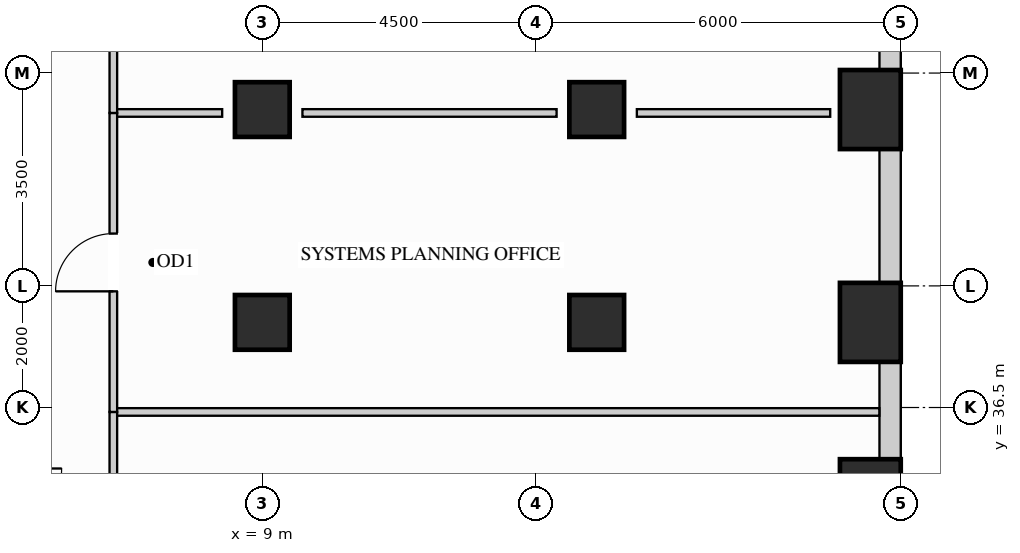
"""IFC4 building model, lengths in metres.
Left out: names, types, materials, properties, quantities, classifications, styles, units other than length and angle.
Written with IfcOpenShell. Run it as: python <this file> out.ifc"""

import sys

from ifc_helpers import new_model, si_unit, direction, frame, frame_2d, origin, origin_2d, place, context, subcontext, project, spatial, rectangle, extrude, source, transform, mapped, element, fill, save


model = new_model("IFC4")
c1 = context("Model", 3, precision=1e-05, world=origin(), true_north=direction((0.0, 1.0)))
c2 = subcontext(c1, "Body", "Model", "MODEL_VIEW")
j1 = project(units=[si_unit("LENGTHUNIT", "METRE"), si_unit("PLANEANGLEUNIT", "RADIAN")], contexts=[c1])
p1 = place(None, origin())
s1 = spatial("IfcSite", under=j1, at=p1, CompositionType="ELEMENT")
p2 = place(p1, origin())
s2 = spatial("IfcBuilding", under=s1, at=p2, CompositionType="ELEMENT")
p3 = place(p2, frame((0.0, 0.0, 22.5)))
s3 = spatial("IfcBuildingStorey", under=s2, at=p3, CompositionType="ELEMENT", Elevation=22.5)
m1 = source(origin(), c2, "Body", "SweptSolid", [
    extrude(rectangle(XDim=0.9, YDim=0.9, at=origin_2d()), origin(), (0.0, 0.0, 1.0), 3.38),
])
for number, where, z_axis, x_axis in (
    (1, (14.5, 37.9, 0.0), (0.0, 0.0, 1.0), (1.0, 0.0, 0.0)),
    (2, (14.5, 41.4, 0.0), (0.0, 0.0, 1.0), (1.0, 0.0, 0.0)),
    (3, (9.0, 37.9, 0.0), (0.0, 0.0, 1.0), (1.0, 0.0, 0.0)),
    (4, (9.0, 41.4, 0.0), (0.0, 0.0, 1.0), (1.0, 0.0, 0.0)),
):
    element("IfcColumn", number, at=place(p3, frame(where, z_axis=z_axis, x_axis=x_axis)), inside=s3, PredefinedType="COLUMN", context=c2, shape_type="MappedRepresentation", body=[
        mapped(m1, transform((0.0, 0.0, 0.0), x_axis=(1.0, 0.0, 0.0), y_axis=(0.0, 1.0, 0.0), z_axis=(0.0, 0.0, 1.0))),
    ])
m2 = source(origin(), c2, "Body", "SweptSolid", [
    extrude(rectangle(XDim=1.0, YDim=1.3, at=origin_2d()), origin(), (0.0, 0.0, 1.0), 3.38),
])
for number, where, z_axis, x_axis in (
    (5, (19.0, 35.0, 0.0), (0.0, 0.0, 1.0), (1.0, 0.0, 0.0)),
    (6, (19.0, 37.9, 0.0), (0.0, 0.0, 1.0), (1.0, 0.0, 0.0)),
    (7, (19.0, 41.4, 0.0), (0.0, 0.0, 1.0), (1.0, 0.0, 0.0)),
):
    element("IfcColumn", number, at=place(p3, frame(where, z_axis=z_axis, x_axis=x_axis)), inside=s3, PredefinedType="COLUMN", context=c2, shape_type="MappedRepresentation", body=[
        mapped(m2, transform((0.0, 0.0, 0.0), x_axis=(1.0, 0.0, 0.0), y_axis=(0.0, 1.0, 0.0), z_axis=(0.0, 0.0, 1.0))),
    ])
m3 = source(origin(), c2, "Body", "SweptSolid", [
    extrude(rectangle(XDim=1.604, YDim=0.35, at=frame_2d((0.802, 0.0))), origin(), (0.0, 0.0, 1.0), 2.51),
])
p4 = place(p3, frame((19.325, 35.648, 0.0), z_axis=(0.0, 0.0, 1.0), x_axis=(0.0, 1.0, 0.0)))
e8 = element("IfcWall", 8, at=p4, inside=s3, PredefinedType="SOLIDWALL", context=c2, shape_type="MappedRepresentation", body=[
    mapped(m3, transform((0.0, 0.0, 0.0), x_axis=(1.0, 0.0, 0.0), y_axis=(0.0, 1.0, 0.0), z_axis=(0.0, 0.0, 1.0))),
])
m4 = source(origin(), c2, "Body", "SweptSolid", [
    extrude(rectangle(XDim=2.204, YDim=0.35, at=frame_2d((1.102, 0.0))), origin(), (0.0, 0.0, 1.0), 2.51),
])
p5 = place(p3, frame((19.325, 38.548, 0.0), z_axis=(0.0, 0.0, 1.0), x_axis=(0.0, 1.0, 0.0)))
e9 = element("IfcWall", 9, at=p5, inside=s3, PredefinedType="SOLIDWALL", context=c2, shape_type="MappedRepresentation", body=[
    mapped(m4, transform((0.0, 0.0, 0.0), x_axis=(1.0, 0.0, 0.0), y_axis=(0.0, 1.0, 0.0), z_axis=(0.0, 0.0, 1.0))),
])
m5 = source(origin(), c2, "Body", "SweptSolid", [
    extrude(rectangle(XDim=2.704, YDim=0.35, at=frame_2d((1.352, 0.0))), origin(), (0.0, 0.0, 1.0), 2.51),
])
p6 = place(p3, frame((19.325, 42.048, 0.0), z_axis=(0.0, 0.0, 1.0), x_axis=(0.0, 1.0, 0.0)))
e10 = element("IfcWall", 10, at=p6, inside=s3, PredefinedType="SOLIDWALL", context=c2, shape_type="MappedRepresentation", body=[
    mapped(m5, transform((0.0, 0.0, 0.0), x_axis=(1.0, 0.0, 0.0), y_axis=(0.0, 1.0, 0.0), z_axis=(0.0, 0.0, 1.0))),
])
m6 = source(origin(), c2, "Body", "SweptSolid", [
    extrude(rectangle(XDim=12.598, YDim=0.125, at=frame_2d((6.299, 0.0))), origin(), (0.0, 0.0, 1.0), 2.828),
])
p7 = place(p3, frame((6.55, 36.427, 0.0), z_axis=(0.0, 0.0, 1.0), x_axis=(1.0, 0.0, 0.0)))
e11 = element("IfcWall", 11, at=p7, inside=s3, PredefinedType="PARTITIONING", context=c2, shape_type="MappedRepresentation", body=[
    mapped(m6, transform((0.0, 0.0, 0.0), x_axis=(1.0, 0.0, 0.0), y_axis=(0.0, 1.0, 0.0), z_axis=(0.0, 0.0, 1.0))),
])
m7 = source(origin(), c2, "Body", "SweptSolid", [
    extrude(rectangle(XDim=1.79, YDim=0.125, at=frame_2d((0.895, 0.0))), origin(), (0.0, 0.0, 1.0), 2.67),
])
p8 = place(p3, frame((6.55, 41.344, 0.0), z_axis=(0.0, 0.0, 1.0), x_axis=(1.0, 0.0, 0.0)))
e12 = element("IfcWall", 12, at=p8, inside=s3, PredefinedType="PARTITIONING", context=c2, shape_type="MappedRepresentation", body=[
    mapped(m7, transform((0.0, 0.0, 0.0), x_axis=(1.0, 0.0, 0.0), y_axis=(0.0, 1.0, 0.0), z_axis=(0.0, 0.0, 1.0))),
])
m8 = source(origin(), c2, "Body", "SweptSolid", [
    extrude(rectangle(XDim=4.18, YDim=0.125, at=frame_2d((2.09, 0.0))), origin(), (0.0, 0.0, 1.0), 2.67),
])
p9 = place(p3, frame((9.66, 41.344, 0.0), z_axis=(0.0, 0.0, 1.0), x_axis=(1.0, 0.0, 0.0)))
e13 = element("IfcWall", 13, at=p9, inside=s3, PredefinedType="PARTITIONING", context=c2, shape_type="MappedRepresentation", body=[
    mapped(m8, transform((0.0, 0.0, 0.0), x_axis=(1.0, 0.0, 0.0), y_axis=(0.0, 1.0, 0.0), z_axis=(0.0, 0.0, 1.0))),
])
m9 = source(origin(), c2, "Body", "SweptSolid", [
    extrude(rectangle(XDim=3.18, YDim=0.125, at=frame_2d((1.59, 0.0))), origin(), (0.0, 0.0, 1.0), 2.67),
])
p10 = place(p3, frame((15.16, 41.344, 0.0), z_axis=(0.0, 0.0, 1.0), x_axis=(1.0, 0.0, 0.0)))
e14 = element("IfcWall", 14, at=p10, inside=s3, PredefinedType="PARTITIONING", context=c2, shape_type="MappedRepresentation", body=[
    mapped(m9, transform((0.0, 0.0, 0.0), x_axis=(1.0, 0.0, 0.0), y_axis=(0.0, 1.0, 0.0), z_axis=(0.0, 0.0, 1.0))),
])
p11 = place(p3, frame((6.55, 31.65, 0.0), z_axis=(0.0, 0.0, 1.0), x_axis=(0.0, 1.0, 0.0)))
e15 = element("IfcWall", 15, at=p11, inside=s3, PredefinedType="PARTITIONING", context=c2, shape_type="SweptSolid", body=[
    extrude(rectangle(XDim=4.777, YDim=0.125, at=frame_2d((2.389, 0.0))), origin(), (0.0, 0.0, 1.0), 3.365),
])
p12 = place(p11, frame((1.914, 0.0, 0.0)))
e16 = element("IfcOpeningElement", 16, at=p12, cuts=e15, PredefinedType="OPENING", context=c2, shape_type="SweptSolid", body=[
    extrude(rectangle(XDim=0.95, YDim=2.15, at=frame_2d((0.475, 1.075))), frame((0.0, 0.073, 0.0), z_axis=(0.0, -1.0, 0.0), x_axis=(1.0, 0.0, 0.0)), (0.0, 0.0, 1.0), 0.145),
])
p13 = place(p3, frame((6.55, 36.427, 0.0), z_axis=(0.0, 0.0, 1.0), x_axis=(0.0, 1.0, 0.0)))
e17 = element("IfcWall", 17, at=p13, inside=s3, PredefinedType="PARTITIONING", context=c2, shape_type="SweptSolid", body=[
    extrude(rectangle(XDim=4.917, YDim=0.125, at=frame_2d((2.458, 0.0))), origin(), (0.0, 0.0, 1.0), 3.365),
])
p14 = place(p13, frame((1.983, 0.0, 0.0)))
e18 = element("IfcOpeningElement", 18, at=p14, cuts=e17, PredefinedType="OPENING", context=c2, shape_type="SweptSolid", body=[
    extrude(rectangle(XDim=0.95, YDim=2.15, at=frame_2d((0.475, 1.075))), frame((0.0, 0.073, 0.0), z_axis=(0.0, -1.0, 0.0), x_axis=(1.0, 0.0, 0.0)), (0.0, 0.0, 1.0), 0.145),
])
p15 = place(p3, frame((6.55, 41.344, 0.0), z_axis=(0.0, 0.0, 1.0), x_axis=(0.0, 1.0, 0.0)))
e19 = element("IfcWall", 19, at=p15, inside=s3, PredefinedType="PARTITIONING", context=c2, shape_type="SweptSolid", body=[
    extrude(rectangle(XDim=4.356, YDim=0.125, at=frame_2d((2.178, 0.0))), origin(), (0.0, 0.0, 1.0), 3.365),
])
p16 = place(p15, frame((1.703, 0.0, 0.0)))
e20 = element("IfcOpeningElement", 20, at=p16, cuts=e19, PredefinedType="OPENING", context=c2, shape_type="SweptSolid", body=[
    extrude(rectangle(XDim=0.95, YDim=2.15, at=frame_2d((0.475, 1.075))), frame((0.0, 0.073, 0.0), z_axis=(0.0, -1.0, 0.0), x_axis=(1.0, 0.0, 0.0)), (0.0, 0.0, 1.0), 0.145),
])
m10 = source(origin(), c2, "Body", "SweptSolid", [
    extrude(rectangle(XDim=0.95, YDim=2.15, at=frame_2d((0.475, 1.075))), frame((0.0, 0.025, 0.0), z_axis=(0.0, -1.0, 0.0), x_axis=(1.0, 0.0, 0.0)), (0.0, 0.0, 1.0), 0.05),
])
p17 = place(p14, origin())
e21 = element("IfcDoor", 21, at=p17, inside=s3, OperationType="SINGLE_SWING_LEFT", PredefinedType="DOOR", context=c2, shape_type="MappedRepresentation", body=[
    mapped(m10, transform((0.0, 0.0, 0.0), x_axis=(1.0, 0.0, 0.0), y_axis=(0.0, 1.0, 0.0), z_axis=(0.0, 0.0, 1.0))),
])
fill(e18, e21)
save(model, sys.argv[1])
